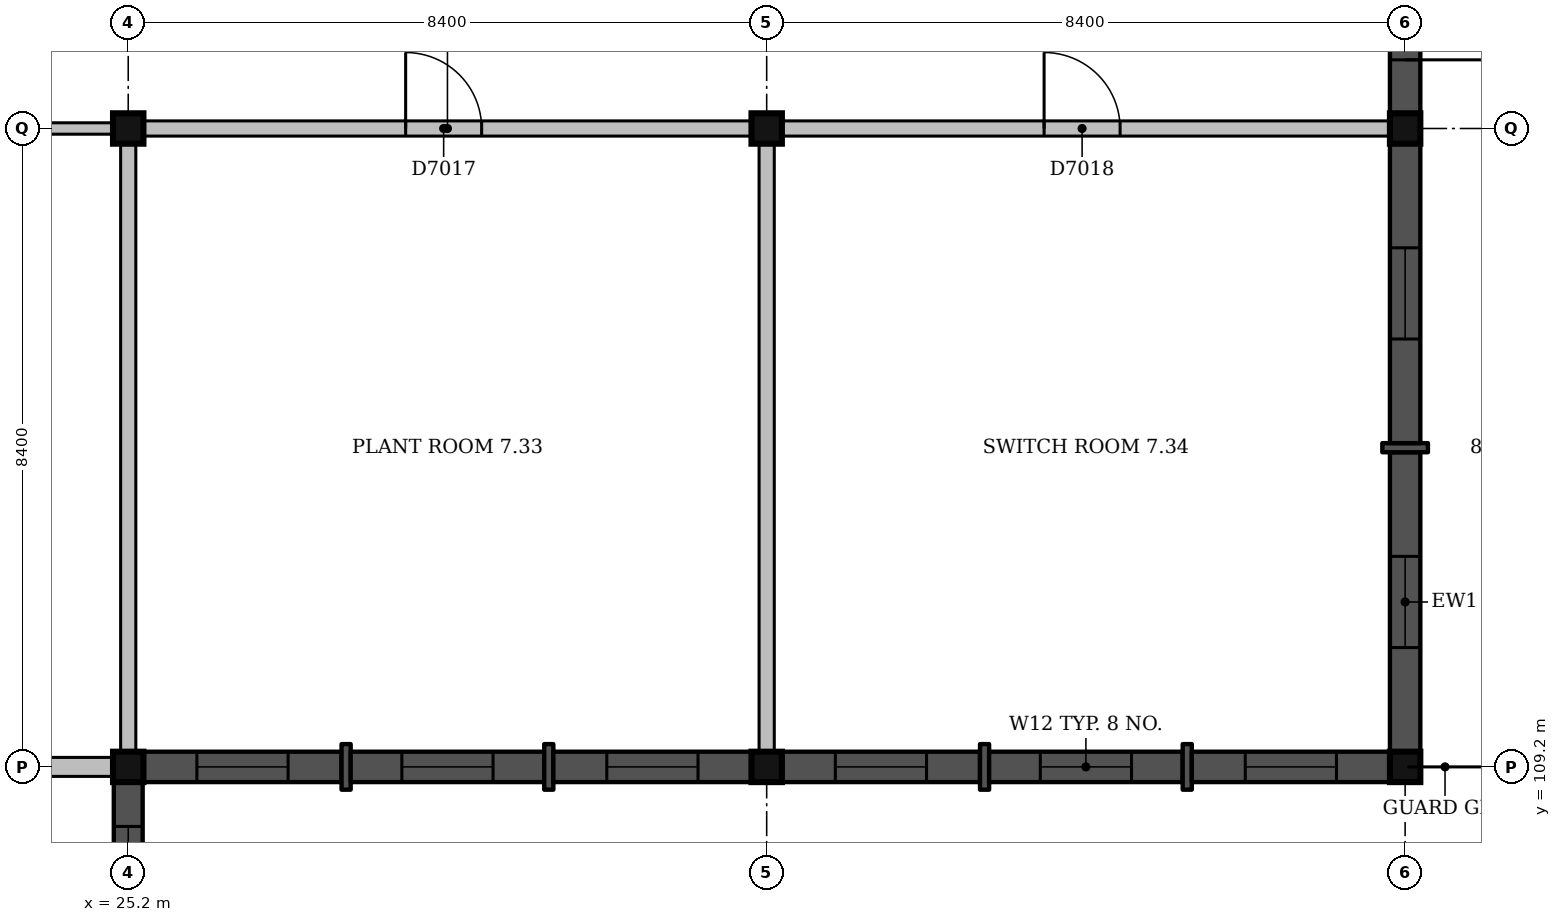
"""IFC4 building model, lengths in metres.
Left out: names, types, materials, properties, quantities, classifications, styles, units other than length and angle.
Written with IfcOpenShell. Run it as: python <this file> out.ifc"""

import sys

from ifc_helpers import new_model, si_unit, direction, frame, frame_2d, origin, origin_2d, place, context, subcontext, project, spatial, rectangle, extrude, element, fill, save


model = new_model("IFC4")
c1 = context("Model", 3, precision=1e-05, world=origin(), true_north=direction((0.0, 1.0)))
c2 = subcontext(c1, "Body", "Model", "MODEL_VIEW")
j1 = project(units=[si_unit("LENGTHUNIT", "METRE"), si_unit("PLANEANGLEUNIT", "RADIAN")], contexts=[c1])
p1 = place(None, origin())
s1 = spatial("IfcSite", under=j1, at=p1, CompositionType="ELEMENT")
p2 = place(p1, origin())
s2 = spatial("IfcBuilding", under=s1, at=p2, CompositionType="ELEMENT")
p3 = place(p2, frame((0.0, 0.0, 31.5)))
s3 = spatial("IfcBuildingStorey", under=s2, at=p3, CompositionType="ELEMENT", Elevation=31.5)
for number, where, z_axis, x_axis in (
    (1, (25.2, 109.2, 0.0), (0.0, 0.0, 1.0), (1.0, 0.0, 0.0)),
    (2, (25.2, 117.6, 0.0), (0.0, 0.0, 1.0), (1.0, 0.0, 0.0)),
    (3, (33.6, 109.2, 0.0), (0.0, 0.0, 1.0), (1.0, 0.0, 0.0)),
    (4, (33.6, 117.6, 0.0), (0.0, 0.0, 1.0), (1.0, 0.0, 0.0)),
    (5, (42.0, 109.2, 0.0), (0.0, 0.0, 1.0), (1.0, 0.0, 0.0)),
    (6, (42.0, 117.6, 0.0), (0.0, 0.0, 1.0), (1.0, 0.0, 0.0)),
):
    element("IfcColumn", number, at=place(p3, frame(where, z_axis=z_axis, x_axis=x_axis)), inside=s3, PredefinedType="COLUMN", context=c2, shape_type="SweptSolid", body=[
        extrude(rectangle(XDim=0.4, YDim=0.4, at=origin_2d()), origin(), (0.0, 0.0, 1.0), 4.5),
    ])
p4 = place(p3, frame((25.2, 106.633, 0.0), z_axis=(0.0, 0.0, 1.0), x_axis=(0.0, 1.0, 0.0)))
e7 = element("IfcWall", 7, at=p4, inside=s3, PredefinedType="SOLIDWALL", context=c2, shape_type="SweptSolid", body=[
    extrude(rectangle(XDim=2.367, YDim=0.38, at=frame_2d((1.183, 0.0))), origin(), (0.0, 0.0, 1.0), 3.6),
])
p5 = place(p4, frame((0.583, 0.0, 0.9)))
e8 = element("IfcOpeningElement", 8, at=p5, cuts=e7, PredefinedType="OPENING", context=c2, shape_type="SweptSolid", body=[
    extrude(rectangle(XDim=1.2, YDim=2.1, at=frame_2d((0.6, 1.05))), frame((0.0, 0.2, 0.0), z_axis=(0.0, -1.0, 0.0), x_axis=(1.0, 0.0, 0.0)), (0.0, 0.0, 1.0), 0.4),
])
p6 = place(p3, frame((42.0, 109.4, 0.0), z_axis=(0.0, 0.0, 1.0), x_axis=(0.0, 1.0, 0.0)))
e9 = element("IfcWall", 9, at=p6, inside=s3, PredefinedType="SOLIDWALL", context=c2, shape_type="SweptSolid", body=[
    extrude(rectangle(XDim=3.94, YDim=0.4, at=frame_2d((1.97, 0.0))), origin(), (0.0, 0.0, 1.0), 3.6),
])
p7 = place(p6, frame((1.37, 0.0, 2.4)))
e10 = element("IfcOpeningElement", 10, at=p7, cuts=e9, PredefinedType="OPENING", context=c2, shape_type="SweptSolid", body=[
    extrude(rectangle(XDim=1.2, YDim=0.6, at=frame_2d((0.6, 0.3))), frame((0.0, 0.21, 0.0), z_axis=(0.0, -1.0, 0.0), x_axis=(1.0, 0.0, 0.0)), (0.0, 0.0, 1.0), 0.42),
])
p8 = place(p3, frame((42.0, 113.34, 0.0), z_axis=(0.0, 0.0, 1.0), x_axis=(0.0, 1.0, 0.0)))
e11 = element("IfcWall", 11, at=p8, inside=s3, PredefinedType="SOLIDWALL", context=c2, shape_type="SweptSolid", body=[
    extrude(rectangle(XDim=0.12, YDim=0.6, at=frame_2d((0.06, 0.0))), origin(), (0.0, 0.0, 1.0), 3.6),
])
p9 = place(p3, frame((42.0, 113.46, 0.0), z_axis=(0.0, 0.0, 1.0), x_axis=(0.0, 1.0, 0.0)))
e12 = element("IfcWall", 12, at=p9, inside=s3, PredefinedType="SOLIDWALL", context=c2, shape_type="SweptSolid", body=[
    extrude(rectangle(XDim=3.94, YDim=0.4, at=frame_2d((1.97, 0.0))), origin(), (0.0, 0.0, 1.0), 3.6),
])
p10 = place(p9, frame((1.37, 0.0, 2.4)))
e13 = element("IfcOpeningElement", 13, at=p10, cuts=e12, PredefinedType="OPENING", context=c2, shape_type="SweptSolid", body=[
    extrude(rectangle(XDim=1.2, YDim=0.6, at=frame_2d((0.6, 0.3))), frame((0.0, 0.21, 0.0), z_axis=(0.0, -1.0, 0.0), x_axis=(1.0, 0.0, 0.0)), (0.0, 0.0, 1.0), 0.42),
])
p11 = place(p3, frame((42.0, 117.8, 0.0), z_axis=(0.0, 0.0, 1.0), x_axis=(0.0, 1.0, 0.0)))
e14 = element("IfcWall", 14, at=p11, inside=s3, PredefinedType="SOLIDWALL", context=c2, shape_type="SweptSolid", body=[
    extrude(rectangle(XDim=2.607, YDim=0.4, at=frame_2d((1.303, 0.0))), origin(), (0.0, 0.0, 1.0), 3.6),
])
p12 = place(p11, frame((0.703, 0.0, 0.0)))
e15 = element("IfcOpeningElement", 15, at=p12, cuts=e14, PredefinedType="OPENING", context=c2, shape_type="SweptSolid", body=[
    extrude(rectangle(XDim=1.2, YDim=2.1, at=frame_2d((0.6, 1.05))), frame((0.0, 0.21, 0.0), z_axis=(0.0, -1.0, 0.0), x_axis=(1.0, 0.0, 0.0)), (0.0, 0.0, 1.0), 0.42),
])
p13 = place(p3, frame((25.4, 109.2, 0.0), z_axis=(0.0, 0.0, 1.0), x_axis=(1.0, 0.0, 0.0)))
e16 = element("IfcWall", 16, at=p13, inside=s3, PredefinedType="SOLIDWALL", context=c2, shape_type="SweptSolid", body=[
    extrude(rectangle(XDim=2.607, YDim=0.4, at=frame_2d((1.303, 0.0))), origin(), (0.0, 0.0, 1.0), 4.2),
])
p14 = place(p13, frame((0.703, 0.0, 2.4)))
e17 = element("IfcOpeningElement", 17, at=p14, cuts=e16, PredefinedType="OPENING", context=c2, shape_type="SweptSolid", body=[
    extrude(rectangle(XDim=1.2, YDim=0.6, at=frame_2d((0.6, 0.3))), frame((0.0, 0.21, 0.0), z_axis=(0.0, -1.0, 0.0), x_axis=(1.0, 0.0, 0.0)), (0.0, 0.0, 1.0), 0.42),
])
p15 = place(p3, frame((28.007, 109.2, 0.0), z_axis=(0.0, 0.0, 1.0), x_axis=(1.0, 0.0, 0.0)))
e18 = element("IfcWall", 18, at=p15, inside=s3, PredefinedType="SOLIDWALL", context=c2, shape_type="SweptSolid", body=[
    extrude(rectangle(XDim=0.12, YDim=0.6, at=frame_2d((0.06, 0.0))), origin(), (0.0, 0.0, 1.0), 4.2),
])
p16 = place(p3, frame((28.127, 109.2, 0.0), z_axis=(0.0, 0.0, 1.0), x_axis=(1.0, 0.0, 0.0)))
e19 = element("IfcWall", 19, at=p16, inside=s3, PredefinedType="SOLIDWALL", context=c2, shape_type="SweptSolid", body=[
    extrude(rectangle(XDim=2.547, YDim=0.4, at=frame_2d((1.273, 0.0))), origin(), (0.0, 0.0, 1.0), 4.2),
])
p17 = place(p16, frame((0.673, 0.0, 2.4)))
e20 = element("IfcOpeningElement", 20, at=p17, cuts=e19, PredefinedType="OPENING", context=c2, shape_type="SweptSolid", body=[
    extrude(rectangle(XDim=1.2, YDim=0.6, at=frame_2d((0.6, 0.3))), frame((0.0, 0.21, 0.0), z_axis=(0.0, -1.0, 0.0), x_axis=(1.0, 0.0, 0.0)), (0.0, 0.0, 1.0), 0.42),
])
p18 = place(p3, frame((30.673, 109.2, 0.0), z_axis=(0.0, 0.0, 1.0), x_axis=(1.0, 0.0, 0.0)))
e21 = element("IfcWall", 21, at=p18, inside=s3, PredefinedType="SOLIDWALL", context=c2, shape_type="SweptSolid", body=[
    extrude(rectangle(XDim=0.12, YDim=0.6, at=frame_2d((0.06, 0.0))), origin(), (0.0, 0.0, 1.0), 4.2),
])
p19 = place(p3, frame((30.793, 109.2, 0.0), z_axis=(0.0, 0.0, 1.0), x_axis=(1.0, 0.0, 0.0)))
e22 = element("IfcWall", 22, at=p19, inside=s3, PredefinedType="SOLIDWALL", context=c2, shape_type="SweptSolid", body=[
    extrude(rectangle(XDim=2.607, YDim=0.4, at=frame_2d((1.303, 0.0))), origin(), (0.0, 0.0, 1.0), 4.2),
])
p20 = place(p19, frame((0.703, 0.0, 2.4)))
e23 = element("IfcOpeningElement", 23, at=p20, cuts=e22, PredefinedType="OPENING", context=c2, shape_type="SweptSolid", body=[
    extrude(rectangle(XDim=1.2, YDim=0.6, at=frame_2d((0.6, 0.3))), frame((0.0, 0.21, 0.0), z_axis=(0.0, -1.0, 0.0), x_axis=(1.0, 0.0, 0.0)), (0.0, 0.0, 1.0), 0.42),
])
p21 = place(p3, frame((33.8, 109.2, 0.0), z_axis=(0.0, 0.0, 1.0), x_axis=(1.0, 0.0, 0.0)))
e24 = element("IfcWall", 24, at=p21, inside=s3, PredefinedType="SOLIDWALL", context=c2, shape_type="SweptSolid", body=[
    extrude(rectangle(XDim=2.607, YDim=0.4, at=frame_2d((1.303, 0.0))), origin(), (0.0, 0.0, 1.0), 3.6),
])
p22 = place(p21, frame((0.703, 0.0, 2.4)))
e25 = element("IfcOpeningElement", 25, at=p22, cuts=e24, PredefinedType="OPENING", context=c2, shape_type="SweptSolid", body=[
    extrude(rectangle(XDim=1.2, YDim=0.6, at=frame_2d((0.6, 0.3))), frame((0.0, 0.21, 0.0), z_axis=(0.0, -1.0, 0.0), x_axis=(1.0, 0.0, 0.0)), (0.0, 0.0, 1.0), 0.42),
])
p23 = place(p3, frame((36.407, 109.2, 0.0), z_axis=(0.0, 0.0, 1.0), x_axis=(1.0, 0.0, 0.0)))
e26 = element("IfcWall", 26, at=p23, inside=s3, PredefinedType="SOLIDWALL", context=c2, shape_type="SweptSolid", body=[
    extrude(rectangle(XDim=0.12, YDim=0.6, at=frame_2d((0.06, 0.0))), origin(), (0.0, 0.0, 1.0), 3.6),
])
p24 = place(p3, frame((36.527, 109.2, 0.0), z_axis=(0.0, 0.0, 1.0), x_axis=(1.0, 0.0, 0.0)))
e27 = element("IfcWall", 27, at=p24, inside=s3, PredefinedType="SOLIDWALL", context=c2, shape_type="SweptSolid", body=[
    extrude(rectangle(XDim=2.547, YDim=0.4, at=frame_2d((1.273, 0.0))), origin(), (0.0, 0.0, 1.0), 3.6),
])
p25 = place(p24, frame((0.673, 0.0, 2.4)))
e28 = element("IfcOpeningElement", 28, at=p25, cuts=e27, PredefinedType="OPENING", context=c2, shape_type="SweptSolid", body=[
    extrude(rectangle(XDim=1.2, YDim=0.6, at=frame_2d((0.6, 0.3))), frame((0.0, 0.21, 0.0), z_axis=(0.0, -1.0, 0.0), x_axis=(1.0, 0.0, 0.0)), (0.0, 0.0, 1.0), 0.42),
])
p26 = place(p3, frame((39.073, 109.2, 0.0), z_axis=(0.0, 0.0, 1.0), x_axis=(1.0, 0.0, 0.0)))
e29 = element("IfcWall", 29, at=p26, inside=s3, PredefinedType="SOLIDWALL", context=c2, shape_type="SweptSolid", body=[
    extrude(rectangle(XDim=0.12, YDim=0.6, at=frame_2d((0.06, 0.0))), origin(), (0.0, 0.0, 1.0), 3.6),
])
p27 = place(p3, frame((39.193, 109.2, 0.0), z_axis=(0.0, 0.0, 1.0), x_axis=(1.0, 0.0, 0.0)))
e30 = element("IfcWall", 30, at=p27, inside=s3, PredefinedType="SOLIDWALL", context=c2, shape_type="SweptSolid", body=[
    extrude(rectangle(XDim=2.607, YDim=0.4, at=frame_2d((1.303, 0.0))), origin(), (0.0, 0.0, 1.0), 3.6),
])
p28 = place(p27, frame((0.703, 0.0, 2.4)))
e31 = element("IfcOpeningElement", 31, at=p28, cuts=e30, PredefinedType="OPENING", context=c2, shape_type="SweptSolid", body=[
    extrude(rectangle(XDim=1.2, YDim=0.6, at=frame_2d((0.6, 0.3))), frame((0.0, 0.21, 0.0), z_axis=(0.0, -1.0, 0.0), x_axis=(1.0, 0.0, 0.0)), (0.0, 0.0, 1.0), 0.42),
])
p29 = place(p3, frame((17.0, 109.2, 0.0), z_axis=(0.0, 0.0, 1.0), x_axis=(1.0, 0.0, 0.0)))
e32 = element("IfcWall", 32, at=p29, inside=s3, PredefinedType="SOLIDWALL", context=c2, shape_type="SweptSolid", body=[
    extrude(rectangle(XDim=8.0, YDim=0.25, at=frame_2d((4.0, 0.0))), origin(), (0.0, 0.0, 1.0), 3.6),
])
p30 = place(p3, frame((17.0, 117.6, 0.0), z_axis=(0.0, 0.0, 1.0), x_axis=(1.0, 0.0, 0.0)))
e33 = element("IfcWall", 33, at=p30, inside=s3, PredefinedType="PARTITIONING", context=c2, shape_type="SweptSolid", body=[
    extrude(rectangle(XDim=8.0, YDim=0.15, at=frame_2d((4.0, 0.0))), origin(), (0.0, 0.0, 1.0), 3.6),
])
p31 = place(p3, frame((25.4, 117.6, 0.0), z_axis=(0.0, 0.0, 1.0), x_axis=(1.0, 0.0, 0.0)))
e34 = element("IfcWall", 34, at=p31, inside=s3, PredefinedType="PARTITIONING", context=c2, shape_type="SweptSolid", body=[
    extrude(rectangle(XDim=8.0, YDim=0.2, at=frame_2d((4.0, 0.0))), origin(), (0.0, 0.0, 1.0), 3.6),
])
p32 = place(p31, frame((3.45, 0.0, 0.0)))
e35 = element("IfcOpeningElement", 35, at=p32, cuts=e34, PredefinedType="OPENING", context=c2, shape_type="SweptSolid", body=[
    extrude(rectangle(XDim=1.0, YDim=2.1, at=frame_2d((0.5, 1.05))), frame((0.0, 0.11, 0.0), z_axis=(0.0, -1.0, 0.0), x_axis=(1.0, 0.0, 0.0)), (0.0, 0.0, 1.0), 0.22),
])
p33 = place(p3, frame((33.8, 117.6, 0.0), z_axis=(0.0, 0.0, 1.0), x_axis=(1.0, 0.0, 0.0)))
e36 = element("IfcWall", 36, at=p33, inside=s3, PredefinedType="PARTITIONING", context=c2, shape_type="SweptSolid", body=[
    extrude(rectangle(XDim=8.0, YDim=0.2, at=frame_2d((4.0, 0.0))), origin(), (0.0, 0.0, 1.0), 3.6),
])
p34 = place(p33, frame((3.45, 0.0, 0.0)))
e37 = element("IfcOpeningElement", 37, at=p34, cuts=e36, PredefinedType="OPENING", context=c2, shape_type="SweptSolid", body=[
    extrude(rectangle(XDim=1.0, YDim=2.1, at=frame_2d((0.5, 1.05))), frame((0.0, 0.11, 0.0), z_axis=(0.0, -1.0, 0.0), x_axis=(1.0, 0.0, 0.0)), (0.0, 0.0, 1.0), 0.22),
])
p35 = place(p3, frame((25.2, 109.4, 0.0), z_axis=(0.0, 0.0, 1.0), x_axis=(0.0, 1.0, 0.0)))
e38 = element("IfcWall", 38, at=p35, inside=s3, PredefinedType="PARTITIONING", context=c2, shape_type="SweptSolid", body=[
    extrude(rectangle(XDim=8.0, YDim=0.2, at=frame_2d((4.0, 0.0))), origin(), (0.0, 0.0, 1.0), 4.15),
])
p36 = place(p3, frame((33.6, 109.4, 0.0), z_axis=(0.0, 0.0, 1.0), x_axis=(0.0, 1.0, 0.0)))
e39 = element("IfcWall", 39, at=p36, inside=s3, PredefinedType="PARTITIONING", context=c2, shape_type="SweptSolid", body=[
    extrude(rectangle(XDim=8.0, YDim=0.2, at=frame_2d((4.0, 0.0))), origin(), (0.0, 0.0, 1.0), 3.6),
])
p37 = place(p5, origin())
e40 = element("IfcWindow", 40, at=p37, inside=s3, PartitioningType="SINGLE_PANEL", PredefinedType="WINDOW", context=c2, shape_type="SweptSolid", body=[
    extrude(rectangle(XDim=1.2, YDim=2.1, at=frame_2d((0.6, 1.05))), frame((0.0, 0.15, 0.0), z_axis=(0.0, -1.0, 0.0), x_axis=(1.0, 0.0, 0.0)), (0.0, 0.0, 1.0), 0.06),
])
fill(e8, e40)
p38 = place(p7, origin())
e41 = element("IfcWindow", 41, at=p38, inside=s3, PartitioningType="SINGLE_PANEL", PredefinedType="WINDOW", context=c2, shape_type="SweptSolid", body=[
    extrude(rectangle(XDim=1.2, YDim=0.6, at=frame_2d((0.6, 0.3))), frame((0.0, 0.16, 0.0), z_axis=(0.0, -1.0, 0.0), x_axis=(1.0, 0.0, 0.0)), (0.0, 0.0, 1.0), 0.06),
])
fill(e10, e41)
p39 = place(p10, origin())
e42 = element("IfcWindow", 42, at=p39, inside=s3, PartitioningType="SINGLE_PANEL", PredefinedType="WINDOW", context=c2, shape_type="SweptSolid", body=[
    extrude(rectangle(XDim=1.2, YDim=0.6, at=frame_2d((0.6, 0.3))), frame((0.0, 0.16, 0.0), z_axis=(0.0, -1.0, 0.0), x_axis=(1.0, 0.0, 0.0)), (0.0, 0.0, 1.0), 0.06),
])
fill(e13, e42)
p40 = place(p12, origin())
e43 = element("IfcDoor", 43, at=p40, inside=s3, OperationType="SINGLE_SWING_LEFT", PredefinedType="DOOR", context=c2, shape_type="SweptSolid", body=[
    extrude(rectangle(XDim=1.2, YDim=2.1, at=frame_2d((0.6, 1.05))), frame((0.0, 0.025, 0.0), z_axis=(0.0, -1.0, 0.0), x_axis=(1.0, 0.0, 0.0)), (0.0, 0.0, 1.0), 0.05),
])
fill(e15, e43)
p41 = place(p14, origin())
e44 = element("IfcWindow", 44, at=p41, inside=s3, PartitioningType="SINGLE_PANEL", PredefinedType="WINDOW", context=c2, shape_type="SweptSolid", body=[
    extrude(rectangle(XDim=1.2, YDim=0.6, at=frame_2d((0.6, 0.3))), frame((0.0, 0.16, 0.0), z_axis=(0.0, -1.0, 0.0), x_axis=(1.0, 0.0, 0.0)), (0.0, 0.0, 1.0), 0.06),
])
fill(e17, e44)
p42 = place(p17, origin())
e45 = element("IfcWindow", 45, at=p42, inside=s3, PartitioningType="SINGLE_PANEL", PredefinedType="WINDOW", context=c2, shape_type="SweptSolid", body=[
    extrude(rectangle(XDim=1.2, YDim=0.6, at=frame_2d((0.6, 0.3))), frame((0.0, 0.16, 0.0), z_axis=(0.0, -1.0, 0.0), x_axis=(1.0, 0.0, 0.0)), (0.0, 0.0, 1.0), 0.06),
])
fill(e20, e45)
p43 = place(p20, origin())
e46 = element("IfcWindow", 46, at=p43, inside=s3, PartitioningType="SINGLE_PANEL", PredefinedType="WINDOW", context=c2, shape_type="SweptSolid", body=[
    extrude(rectangle(XDim=1.2, YDim=0.6, at=frame_2d((0.6, 0.3))), frame((0.0, 0.16, 0.0), z_axis=(0.0, -1.0, 0.0), x_axis=(1.0, 0.0, 0.0)), (0.0, 0.0, 1.0), 0.06),
])
fill(e23, e46)
p44 = place(p22, origin())
e47 = element("IfcWindow", 47, at=p44, inside=s3, PartitioningType="SINGLE_PANEL", PredefinedType="WINDOW", context=c2, shape_type="SweptSolid", body=[
    extrude(rectangle(XDim=1.2, YDim=0.6, at=frame_2d((0.6, 0.3))), frame((0.0, 0.16, 0.0), z_axis=(0.0, -1.0, 0.0), x_axis=(1.0, 0.0, 0.0)), (0.0, 0.0, 1.0), 0.06),
])
fill(e25, e47)
p45 = place(p25, origin())
e48 = element("IfcWindow", 48, at=p45, inside=s3, PartitioningType="SINGLE_PANEL", PredefinedType="WINDOW", context=c2, shape_type="SweptSolid", body=[
    extrude(rectangle(XDim=1.2, YDim=0.6, at=frame_2d((0.6, 0.3))), frame((0.0, 0.16, 0.0), z_axis=(0.0, -1.0, 0.0), x_axis=(1.0, 0.0, 0.0)), (0.0, 0.0, 1.0), 0.06),
])
fill(e28, e48)
p46 = place(p28, origin())
e49 = element("IfcWindow", 49, at=p46, inside=s3, PartitioningType="SINGLE_PANEL", PredefinedType="WINDOW", context=c2, shape_type="SweptSolid", body=[
    extrude(rectangle(XDim=1.2, YDim=0.6, at=frame_2d((0.6, 0.3))), frame((0.0, 0.16, 0.0), z_axis=(0.0, -1.0, 0.0), x_axis=(1.0, 0.0, 0.0)), (0.0, 0.0, 1.0), 0.06),
])
fill(e31, e49)
p47 = place(p32, origin())
e50 = element("IfcDoor", 50, at=p47, inside=s3, OperationType="SINGLE_SWING_LEFT", PredefinedType="DOOR", context=c2, shape_type="SweptSolid", body=[
    extrude(rectangle(XDim=1.0, YDim=2.1, at=frame_2d((0.5, 1.05))), frame((0.0, 0.025, 0.0), z_axis=(0.0, -1.0, 0.0), x_axis=(1.0, 0.0, 0.0)), (0.0, 0.0, 1.0), 0.05),
])
fill(e35, e50)
p48 = place(p34, origin())
e51 = element("IfcDoor", 51, at=p48, inside=s3, OperationType="SINGLE_SWING_LEFT", PredefinedType="DOOR", context=c2, shape_type="SweptSolid", body=[
    extrude(rectangle(XDim=1.0, YDim=2.1, at=frame_2d((0.5, 1.05))), frame((0.0, 0.025, 0.0), z_axis=(0.0, -1.0, 0.0), x_axis=(1.0, 0.0, 0.0)), (0.0, 0.0, 1.0), 0.05),
])
fill(e37, e51)
save(model, sys.argv[1])
